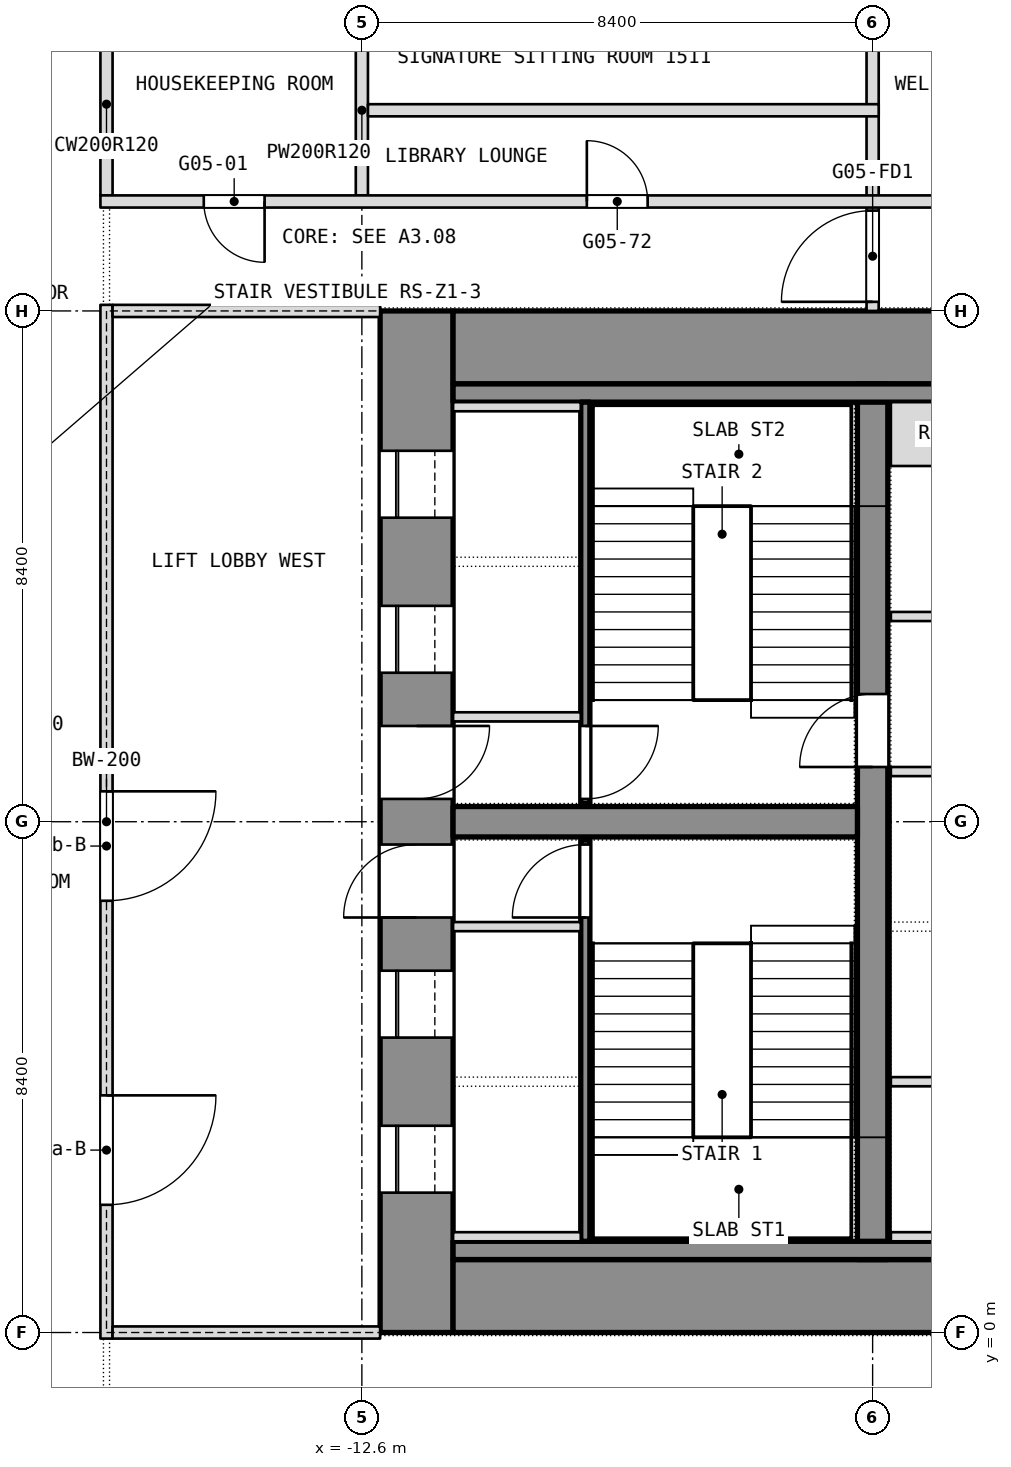
"""IFC4 building model, lengths in metres.
Left out: names, types, materials, properties, quantities, classifications, styles, units other than length and angle.
Written with IfcOpenShell. Run it as: python <this file> out.ifc"""

import sys

from ifc_helpers import new_model, si_unit, direction, frame, frame_2d, origin, place, context, subcontext, project, spatial, rectangle, extrude, element, fill, save


model = new_model("IFC4")
c1 = context("Model", 3, precision=1e-05, world=origin(), true_north=direction((0.0, 1.0)))
c2 = subcontext(c1, "Body", "Model", "MODEL_VIEW")
j1 = project(units=[si_unit("LENGTHUNIT", "METRE"), si_unit("PLANEANGLEUNIT", "RADIAN")], contexts=[c1])
p1 = place(None, origin())
s1 = spatial("IfcSite", under=j1, at=p1, CompositionType="ELEMENT")
p2 = place(p1, origin())
s2 = spatial("IfcBuilding", under=s1, at=p2, CompositionType="ELEMENT")
p3 = place(p2, frame((0.0, 0.0, 68.9)))
s3 = spatial("IfcBuildingStorey", under=s2, at=p3, CompositionType="ELEMENT", Elevation=68.9)
p4 = place(p3, frame((-11.7, 0.0, 0.0), z_axis=(0.0, 0.0, 1.0), x_axis=(0.0, 1.0, 0.0)))
e1 = element("IfcWall", 1, at=p4, inside=s3, PredefinedType="SHEAR", context=c2, shape_type="SweptSolid", body=[
    extrude(rectangle(XDim=16.8, YDim=1.2, at=frame_2d((8.4, 0.0))), origin(), (0.0, 0.0, 1.0), 3.6),
])
p5 = place(p4, frame((2.3, 0.0, 0.0)))
e2 = element("IfcOpeningElement", 2, at=p5, cuts=e1, PredefinedType="OPENING", context=c2, shape_type="SweptSolid", body=[
    extrude(rectangle(XDim=1.1, YDim=2.1, at=frame_2d((0.55, 1.05))), frame((0.0, 0.6, 0.0), z_axis=(0.0, -1.0, 0.0), x_axis=(1.0, 0.0, 0.0)), (0.0, 0.0, 1.0), 1.2),
])
p6 = place(p4, frame((4.85, 0.0, 0.0)))
e3 = element("IfcOpeningElement", 3, at=p6, cuts=e1, PredefinedType="OPENING", context=c2, shape_type="SweptSolid", body=[
    extrude(rectangle(XDim=1.1, YDim=2.1, at=frame_2d((0.55, 1.05))), frame((0.0, 0.6, 0.0), z_axis=(0.0, -1.0, 0.0), x_axis=(1.0, 0.0, 0.0)), (0.0, 0.0, 1.0), 1.2),
])
p7 = place(p4, frame((6.825, 0.0, 0.0)))
e4 = element("IfcOpeningElement", 4, at=p7, cuts=e1, PredefinedType="OPENING", context=c2, shape_type="SweptSolid", body=[
    extrude(rectangle(XDim=1.2, YDim=2.1, at=frame_2d((0.6, 1.05))), frame((0.0, 0.6, 0.0), z_axis=(0.0, -1.0, 0.0), x_axis=(1.0, 0.0, 0.0)), (0.0, 0.0, 1.0), 1.2),
])
p8 = place(p4, frame((13.4, 0.0, 0.0)))
e5 = element("IfcOpeningElement", 5, at=p8, cuts=e1, PredefinedType="OPENING", context=c2, shape_type="SweptSolid", body=[
    extrude(rectangle(XDim=1.1, YDim=2.1, at=frame_2d((0.55, 1.05))), frame((0.0, 0.6, 0.0), z_axis=(0.0, -1.0, 0.0), x_axis=(1.0, 0.0, 0.0)), (0.0, 0.0, 1.0), 1.2),
])
p9 = place(p4, frame((10.85, 0.0, 0.0)))
e6 = element("IfcOpeningElement", 6, at=p9, cuts=e1, PredefinedType="OPENING", context=c2, shape_type="SweptSolid", body=[
    extrude(rectangle(XDim=1.1, YDim=2.1, at=frame_2d((0.55, 1.05))), frame((0.0, 0.6, 0.0), z_axis=(0.0, -1.0, 0.0), x_axis=(1.0, 0.0, 0.0)), (0.0, 0.0, 1.0), 1.2),
])
p10 = place(p4, frame((8.775, 0.0, 0.0)))
e7 = element("IfcOpeningElement", 7, at=p10, cuts=e1, PredefinedType="OPENING", context=c2, shape_type="SweptSolid", body=[
    extrude(rectangle(XDim=1.2, YDim=2.1, at=frame_2d((0.6, 1.05))), frame((0.0, 0.6, 0.0), z_axis=(0.0, -1.0, 0.0), x_axis=(1.0, 0.0, 0.0)), (0.0, 0.0, 1.0), 1.2),
])
for number, where, z_axis, x_axis in (
    (8, (-11.1, 0.6, 0.0), (0.0, 0.0, 1.0), (1.0, 0.0, 0.0)),
    (9, (-11.1, 16.2, 0.0), (0.0, 0.0, 1.0), (1.0, 0.0, 0.0)),
):
    element("IfcWall", number, at=place(p3, frame(where, z_axis=z_axis, x_axis=x_axis)), inside=s3, PredefinedType="SHEAR", context=c2, shape_type="SweptSolid", body=[
        extrude(rectangle(XDim=22.2, YDim=1.2, at=frame_2d((11.1, 0.0))), origin(), (0.0, 0.0, 1.0), 3.6),
    ])
p11 = place(p3, frame((-4.2, 1.2, 0.0), z_axis=(0.0, 0.0, 1.0), x_axis=(0.0, 1.0, 0.0)))
e10 = element("IfcWall", 10, at=p11, inside=s3, PredefinedType="SHEAR", context=c2, shape_type="SweptSolid", body=[
    extrude(rectangle(XDim=14.4, YDim=0.5, at=frame_2d((7.2, 0.0))), origin(), (0.0, 0.0, 1.0), 3.6),
])
p12 = place(p11, frame((8.1, 0.0, 0.0)))
e11 = element("IfcOpeningElement", 11, at=p12, cuts=e10, PredefinedType="OPENING", context=c2, shape_type="SweptSolid", body=[
    extrude(rectangle(XDim=1.2, YDim=2.1, at=frame_2d((0.6, 1.05))), frame((0.0, 0.25, 0.0), z_axis=(0.0, -1.0, 0.0), x_axis=(1.0, 0.0, 0.0)), (0.0, 0.0, 1.0), 0.5),
])
p13 = place(p3, frame((-11.1, 8.4, 0.0), z_axis=(0.0, 0.0, 1.0), x_axis=(1.0, 0.0, 0.0)))
e12 = element("IfcWall", 12, at=p13, inside=s3, PredefinedType="SHEAR", context=c2, shape_type="SweptSolid", body=[
    extrude(rectangle(XDim=6.65, YDim=0.5, at=frame_2d((3.325, 0.0))), origin(), (0.0, 0.0, 1.0), 3.6),
])
p14 = place(p3, frame((-4.2, 16.8, 0.0), z_axis=(0.0, 0.0, 1.0), x_axis=(0.0, 1.0, 0.0)))
e13 = element("IfcWall", 13, at=p14, inside=s3, PredefinedType="PARTITIONING", context=c2, shape_type="SweptSolid", body=[
    extrude(rectangle(XDim=6.7, YDim=0.2, at=frame_2d((3.35, 0.0))), origin(), (0.0, 0.0, 1.0), 3.34),
])
p15 = place(p14, frame((0.15, 0.0, 0.0)))
e14 = element("IfcOpeningElement", 14, at=p15, cuts=e13, PredefinedType="OPENING", context=c2, shape_type="SweptSolid", body=[
    extrude(rectangle(XDim=1.5, YDim=2.1, at=frame_2d((0.75, 1.05))), frame((0.0, 0.1, 0.0), z_axis=(0.0, -1.0, 0.0), x_axis=(1.0, 0.0, 0.0)), (0.0, 0.0, 1.0), 0.2),
])
p16 = place(p14, frame((4.95, 0.0, 0.0)))
e15 = element("IfcOpeningElement", 15, at=p16, cuts=e13, PredefinedType="OPENING", context=c2, shape_type="SweptSolid", body=[
    extrude(rectangle(XDim=1.5, YDim=2.1, at=frame_2d((0.75, 1.05))), frame((0.0, 0.1, 0.0), z_axis=(0.0, -1.0, 0.0), x_axis=(1.0, 0.0, 0.0)), (0.0, 0.0, 1.0), 0.2),
])
p17 = place(p3, frame((-12.6, 18.7, 0.0), z_axis=(0.0, 0.0, 1.0), x_axis=(0.0, 1.0, 0.0)))
e16 = element("IfcWall", 16, at=p17, inside=s3, PredefinedType="PARTITIONING", context=c2, shape_type="SweptSolid", body=[
    extrude(rectangle(XDim=2.8, YDim=0.2, at=frame_2d((1.4, 0.0))), origin(), (0.0, 0.0, 1.0), 3.34),
])
p18 = place(p3, frame((-16.8, 18.7, 0.0), z_axis=(0.0, 0.0, 1.0), x_axis=(0.0, 1.0, 0.0)))
e17 = element("IfcWall", 17, at=p18, inside=s3, PredefinedType="PARTITIONING", context=c2, shape_type="SweptSolid", body=[
    extrude(rectangle(XDim=3.0, YDim=0.2, at=frame_2d((1.5, 0.0))), origin(), (0.0, 0.0, 1.0), 3.34),
])
p19 = place(p3, frame((-16.9, 18.6, 0.0), z_axis=(0.0, 0.0, 1.0), x_axis=(1.0, 0.0, 0.0)))
e18 = element("IfcWall", 18, at=p19, inside=s3, PredefinedType="PARTITIONING", context=c2, shape_type="SweptSolid", body=[
    extrude(rectangle(XDim=25.1, YDim=0.2, at=frame_2d((12.55, 0.0))), origin(), (0.0, 0.0, 1.0), 3.34),
])
p20 = place(p19, frame((1.7, 0.0, 0.0)))
e19 = element("IfcOpeningElement", 19, at=p20, cuts=e18, PredefinedType="OPENING", context=c2, shape_type="SweptSolid", body=[
    extrude(rectangle(XDim=1.0, YDim=2.1, at=frame_2d((0.5, 1.05))), frame((0.0, 0.1, 0.0), z_axis=(0.0, -1.0, 0.0), x_axis=(1.0, 0.0, 0.0)), (0.0, 0.0, 1.0), 0.2),
])
p21 = place(p19, frame((8.0, 0.0, 0.0)))
e20 = element("IfcOpeningElement", 20, at=p21, cuts=e18, PredefinedType="OPENING", context=c2, shape_type="SweptSolid", body=[
    extrude(rectangle(XDim=1.0, YDim=2.1, at=frame_2d((0.5, 1.05))), frame((0.0, 0.1, 0.0), z_axis=(0.0, -1.0, 0.0), x_axis=(1.0, 0.0, 0.0)), (0.0, 0.0, 1.0), 0.2),
])
p22 = place(p19, frame((22.55, 0.0, 0.0)))
e21 = element("IfcOpeningElement", 21, at=p22, cuts=e18, PredefinedType="OPENING", context=c2, shape_type="SweptSolid", body=[
    extrude(rectangle(XDim=1.0, YDim=2.1, at=frame_2d((0.5, 1.05))), frame((0.0, 0.1, 0.0), z_axis=(0.0, -1.0, 0.0), x_axis=(1.0, 0.0, 0.0)), (0.0, 0.0, 1.0), 0.2),
])
p23 = place(p19, frame((14.3, 0.0, 0.0)))
e22 = element("IfcOpeningElement", 22, at=p23, cuts=e18, PredefinedType="OPENING", context=c2, shape_type="SweptSolid", body=[
    extrude(rectangle(XDim=1.0, YDim=2.1, at=frame_2d((0.5, 1.05))), frame((0.0, 0.1, 0.0), z_axis=(0.0, -1.0, 0.0), x_axis=(1.0, 0.0, 0.0)), (0.0, 0.0, 1.0), 0.2),
])
p24 = place(p19, frame((18.5, 0.0, 0.0)))
e23 = element("IfcOpeningElement", 23, at=p24, cuts=e18, PredefinedType="OPENING", context=c2, shape_type="SweptSolid", body=[
    extrude(rectangle(XDim=1.0, YDim=2.1, at=frame_2d((0.5, 1.05))), frame((0.0, 0.1, 0.0), z_axis=(0.0, -1.0, 0.0), x_axis=(1.0, 0.0, 0.0)), (0.0, 0.0, 1.0), 0.2),
])
p25 = place(p3, frame((-12.5, 20.1, 0.0), z_axis=(0.0, 0.0, 1.0), x_axis=(1.0, 0.0, 0.0)))
e24 = element("IfcWall", 24, at=p25, inside=s3, PredefinedType="PARTITIONING", context=c2, shape_type="SweptSolid", body=[
    extrude(rectangle(XDim=8.4, YDim=0.2, at=frame_2d((4.2, 0.0))), origin(), (0.0, 0.0, 1.0), 3.34),
])
for number, where, z_axis, x_axis in (
    (25, (-11.1, 1.35, 0.0), (0.0, 0.0, 1.0), (1.0, 0.0, 0.0)),
    (26, (-11.1, 15.45, 0.0), (0.0, 0.0, 1.0), (1.0, 0.0, 0.0)),
):
    element("IfcWall", number, at=place(p3, frame(where, z_axis=z_axis, x_axis=x_axis)), inside=s3, PredefinedType="PARTITIONING", context=c2, shape_type="SweptSolid", body=[
        extrude(rectangle(XDim=22.2, YDim=0.3, at=frame_2d((11.1, 0.0))), origin(), (0.0, 0.0, 1.0), 3.34),
    ])
p26 = place(p3, frame((-8.925, 1.5, 0.0), z_axis=(0.0, 0.0, 1.0), x_axis=(0.0, 1.0, 0.0)))
e27 = element("IfcWall", 27, at=p26, inside=s3, PredefinedType="SHEAR", context=c2, shape_type="SweptSolid", body=[
    extrude(rectangle(XDim=6.6, YDim=0.15, at=frame_2d((3.3, 0.0))), origin(), (0.0, 0.0, 1.0), 3.34),
])
p27 = place(p26, frame((5.325, 0.0, 0.0)))
e28 = element("IfcOpeningElement", 28, at=p27, cuts=e27, PredefinedType="OPENING", context=c2, shape_type="SweptSolid", body=[
    extrude(rectangle(XDim=1.2, YDim=2.1, at=frame_2d((0.6, 1.05))), frame((0.0, 0.075, 0.0), z_axis=(0.0, -1.0, 0.0), x_axis=(1.0, 0.0, 0.0)), (0.0, 0.0, 1.0), 0.15),
])
for number, where, z_axis, x_axis in (
    (29, (-11.1, 6.675, 0.0), (0.0, 0.0, 1.0), (1.0, 0.0, 0.0)),
    (30, (-11.1, 1.575, 0.0), (0.0, 0.0, 1.0), (1.0, 0.0, 0.0)),
):
    element("IfcWall", number, at=place(p3, frame(where, z_axis=z_axis, x_axis=x_axis)), inside=s3, PredefinedType="SHEAR", context=c2, shape_type="SweptSolid", body=[
        extrude(rectangle(XDim=2.1, YDim=0.15, at=frame_2d((1.05, 0.0))), origin(), (0.0, 0.0, 1.0), 3.6),
    ])
p28 = place(p3, frame((-8.925, 8.7, 0.0), z_axis=(0.0, 0.0, 1.0), x_axis=(0.0, 1.0, 0.0)))
e31 = element("IfcWall", 31, at=p28, inside=s3, PredefinedType="SHEAR", context=c2, shape_type="SweptSolid", body=[
    extrude(rectangle(XDim=6.6, YDim=0.15, at=frame_2d((3.3, 0.0))), origin(), (0.0, 0.0, 1.0), 3.34),
])
p29 = place(p28, frame((0.075, 0.0, 0.0)))
e32 = element("IfcOpeningElement", 32, at=p29, cuts=e31, PredefinedType="OPENING", context=c2, shape_type="SweptSolid", body=[
    extrude(rectangle(XDim=1.2, YDim=2.1, at=frame_2d((0.6, 1.05))), frame((0.0, 0.075, 0.0), z_axis=(0.0, -1.0, 0.0), x_axis=(1.0, 0.0, 0.0)), (0.0, 0.0, 1.0), 0.15),
])
for number, where, z_axis, x_axis in (
    (33, (-11.1, 10.125, 0.0), (0.0, 0.0, 1.0), (1.0, 0.0, 0.0)),
    (34, (-11.1, 15.225, 0.0), (0.0, 0.0, 1.0), (1.0, 0.0, 0.0)),
):
    element("IfcWall", number, at=place(p3, frame(where, z_axis=z_axis, x_axis=x_axis)), inside=s3, PredefinedType="SHEAR", context=c2, shape_type="SweptSolid", body=[
        extrude(rectangle(XDim=2.1, YDim=0.15, at=frame_2d((1.05, 0.0))), origin(), (0.0, 0.0, 1.0), 3.6),
    ])
p30 = place(p3, frame((-3.9, 4.125, 0.0), z_axis=(0.0, 0.0, 1.0), x_axis=(1.0, 0.0, 0.0)))
e35 = element("IfcWall", 35, at=p30, inside=s3, PredefinedType="PARTITIONING", context=c2, shape_type="SweptSolid", body=[
    extrude(rectangle(XDim=7.8, YDim=0.15, at=frame_2d((3.9, 0.0))), origin(), (0.0, 0.0, 1.0), 3.34),
])
p31 = place(p30, frame((3.75, 0.0, 0.0)))
e36 = element("IfcOpeningElement", 36, at=p31, cuts=e35, PredefinedType="OPENING", context=c2, shape_type="SweptSolid", body=[
    extrude(rectangle(XDim=1.2, YDim=2.1, at=frame_2d((0.6, 1.05))), frame((0.0, 0.075, 0.0), z_axis=(0.0, -1.0, 0.0), x_axis=(1.0, 0.0, 0.0)), (0.0, 0.0, 1.0), 0.15),
])
p32 = place(p3, frame((-3.9, 11.775, 0.0), z_axis=(0.0, 0.0, 1.0), x_axis=(1.0, 0.0, 0.0)))
e37 = element("IfcWall", 37, at=p32, inside=s3, PredefinedType="PARTITIONING", context=c2, shape_type="SweptSolid", body=[
    extrude(rectangle(XDim=7.8, YDim=0.15, at=frame_2d((3.9, 0.0))), origin(), (0.0, 0.0, 1.0), 3.34),
])
p33 = place(p32, frame((3.3, 0.0, 0.0)))
e38 = element("IfcOpeningElement", 38, at=p33, cuts=e37, PredefinedType="OPENING", context=c2, shape_type="SweptSolid", body=[
    extrude(rectangle(XDim=1.2, YDim=2.1, at=frame_2d((0.6, 1.05))), frame((0.0, 0.075, 0.0), z_axis=(0.0, -1.0, 0.0), x_axis=(1.0, 0.0, 0.0)), (0.0, 0.0, 1.0), 0.15),
])
p34 = place(p3, frame((-3.9, 1.575, 0.0), z_axis=(0.0, 0.0, 1.0), x_axis=(1.0, 0.0, 0.0)))
e39 = element("IfcWall", 39, at=p34, inside=s3, PredefinedType="SHEAR", context=c2, shape_type="SweptSolid", body=[
    extrude(rectangle(XDim=3.0, YDim=0.15, at=frame_2d((1.5, 0.0))), origin(), (0.0, 0.0, 1.0), 3.6),
])
p35 = place(p3, frame((-3.9, 9.225, 0.0), z_axis=(0.0, 0.0, 1.0), x_axis=(1.0, 0.0, 0.0)))
e40 = element("IfcWall", 40, at=p35, inside=s3, PredefinedType="SHEAR", context=c2, shape_type="SweptSolid", body=[
    extrude(rectangle(XDim=2.25, YDim=0.15, at=frame_2d((1.125, 0.0))), origin(), (0.0, 0.0, 1.0), 3.6),
])
p36 = place(p3, frame((-3.9, 14.775, 0.0), z_axis=(0.0, 0.0, 1.0), x_axis=(1.0, 0.0, 0.0)))
e41 = element("IfcWall", 41, at=p36, inside=s3, PredefinedType="PARTITIONING", context=c2, shape_type="SweptSolid", body=[
    extrude(rectangle(XDim=2.25, YDim=1.05, at=frame_2d((1.125, 0.0))), origin(), (0.0, 0.0, 1.0), 3.34),
])
p37 = place(p3, frame((-16.8, -0.1, 0.0), z_axis=(0.0, 0.0, 1.0), x_axis=(0.0, 1.0, 0.0)))
e42 = element("IfcWall", 42, at=p37, inside=s3, PredefinedType="PARTITIONING", context=c2, shape_type="SweptSolid", body=[
    extrude(rectangle(XDim=17.0, YDim=0.2, at=frame_2d((8.5, 0.0))), origin(), (0.0, 0.0, 1.0), 3.34),
])
p38 = place(p37, frame((2.2, 0.0, 0.0)))
e43 = element("IfcOpeningElement", 43, at=p38, cuts=e42, PredefinedType="OPENING", context=c2, shape_type="SweptSolid", body=[
    extrude(rectangle(XDim=1.8, YDim=2.1, at=frame_2d((0.9, 1.05))), frame((0.0, 0.1, 0.0), z_axis=(0.0, -1.0, 0.0), x_axis=(1.0, 0.0, 0.0)), (0.0, 0.0, 1.0), 0.2),
])
p39 = place(p37, frame((7.2, 0.0, 0.0)))
e44 = element("IfcOpeningElement", 44, at=p39, cuts=e42, PredefinedType="OPENING", context=c2, shape_type="SweptSolid", body=[
    extrude(rectangle(XDim=1.8, YDim=2.1, at=frame_2d((0.9, 1.05))), frame((0.0, 0.1, 0.0), z_axis=(0.0, -1.0, 0.0), x_axis=(1.0, 0.0, 0.0)), (0.0, 0.0, 1.0), 0.2),
])
for number, where, z_axis, x_axis in (
    (45, (-16.7, 0.0, 0.0), (0.0, 0.0, 1.0), (1.0, 0.0, 0.0)),
    (46, (-16.7, 16.8, 0.0), (0.0, 0.0, 1.0), (1.0, 0.0, 0.0)),
):
    element("IfcWall", number, at=place(p3, frame(where, z_axis=z_axis, x_axis=x_axis)), inside=s3, PredefinedType="PARTITIONING", context=c2, shape_type="SweptSolid", body=[
        extrude(rectangle(XDim=4.4, YDim=0.2, at=frame_2d((2.2, 0.0))), origin(), (0.0, 0.0, 1.0), 2.84),
    ])
p40 = place(p20, origin())
e47 = element("IfcDoor", 47, at=p40, inside=s3, OperationType="SINGLE_SWING_RIGHT", PredefinedType="DOOR", context=c2, shape_type="SweptSolid", body=[
    extrude(rectangle(XDim=1.0, YDim=2.1, at=frame_2d((0.5, 1.05))), frame((0.0, 0.025, 0.0), z_axis=(0.0, -1.0, 0.0), x_axis=(1.0, 0.0, 0.0)), (0.0, 0.0, 1.0), 0.05),
])
fill(e19, e47)
p41 = place(p21, origin())
e48 = element("IfcDoor", 48, at=p41, inside=s3, OperationType="SINGLE_SWING_RIGHT", PredefinedType="DOOR", context=c2, shape_type="SweptSolid", body=[
    extrude(rectangle(XDim=1.0, YDim=2.1, at=frame_2d((0.5, 1.05))), frame((0.0, 0.025, 0.0), z_axis=(0.0, -1.0, 0.0), x_axis=(1.0, 0.0, 0.0)), (0.0, 0.0, 1.0), 0.05),
])
fill(e20, e48)
p42 = place(p5, origin())
e49 = element("IfcDoor", 49, at=p42, inside=s3, OperationType="SLIDING_TO_LEFT", PredefinedType="DOOR", context=c2, shape_type="SweptSolid", body=[
    extrude(rectangle(XDim=1.1, YDim=2.1, at=frame_2d((0.55, 1.05))), frame((0.0, 0.025, 0.0), z_axis=(0.0, -1.0, 0.0), x_axis=(1.0, 0.0, 0.0)), (0.0, 0.0, 1.0), 0.05),
])
fill(e2, e49)
p43 = place(p6, origin())
e50 = element("IfcDoor", 50, at=p43, inside=s3, OperationType="SLIDING_TO_LEFT", PredefinedType="DOOR", context=c2, shape_type="SweptSolid", body=[
    extrude(rectangle(XDim=1.1, YDim=2.1, at=frame_2d((0.55, 1.05))), frame((0.0, 0.025, 0.0), z_axis=(0.0, -1.0, 0.0), x_axis=(1.0, 0.0, 0.0)), (0.0, 0.0, 1.0), 0.05),
])
fill(e3, e50)
p44 = place(p7, origin())
e51 = element("IfcDoor", 51, at=p44, inside=s3, OperationType="SINGLE_SWING_LEFT", PredefinedType="DOOR", context=c2, shape_type="SweptSolid", body=[
    extrude(rectangle(XDim=1.2, YDim=2.1, at=frame_2d((0.6, 1.05))), frame((0.0, 0.025, 0.0), z_axis=(0.0, -1.0, 0.0), x_axis=(1.0, 0.0, 0.0)), (0.0, 0.0, 1.0), 0.05),
])
fill(e4, e51)
p45 = place(p27, origin())
e52 = element("IfcDoor", 52, at=p45, inside=s3, OperationType="SINGLE_SWING_LEFT", PredefinedType="DOOR", context=c2, shape_type="SweptSolid", body=[
    extrude(rectangle(XDim=1.2, YDim=2.1, at=frame_2d((0.6, 1.05))), frame((0.0, 0.025, 0.0), z_axis=(0.0, -1.0, 0.0), x_axis=(1.0, 0.0, 0.0)), (0.0, 0.0, 1.0), 0.05),
])
fill(e28, e52)
p46 = place(p8, origin())
e53 = element("IfcDoor", 53, at=p46, inside=s3, OperationType="SLIDING_TO_LEFT", PredefinedType="DOOR", context=c2, shape_type="SweptSolid", body=[
    extrude(rectangle(XDim=1.1, YDim=2.1, at=frame_2d((0.55, 1.05))), frame((0.0, 0.025, 0.0), z_axis=(0.0, -1.0, 0.0), x_axis=(1.0, 0.0, 0.0)), (0.0, 0.0, 1.0), 0.05),
])
fill(e5, e53)
p47 = place(p9, origin())
e54 = element("IfcDoor", 54, at=p47, inside=s3, OperationType="SLIDING_TO_LEFT", PredefinedType="DOOR", context=c2, shape_type="SweptSolid", body=[
    extrude(rectangle(XDim=1.1, YDim=2.1, at=frame_2d((0.55, 1.05))), frame((0.0, 0.025, 0.0), z_axis=(0.0, -1.0, 0.0), x_axis=(1.0, 0.0, 0.0)), (0.0, 0.0, 1.0), 0.05),
])
fill(e6, e54)
p48 = place(p10, origin())
e55 = element("IfcDoor", 55, at=p48, inside=s3, OperationType="SINGLE_SWING_LEFT", PredefinedType="DOOR", context=c2, shape_type="SweptSolid", body=[
    extrude(rectangle(XDim=1.2, YDim=2.1, at=frame_2d((0.6, 1.05))), frame((0.0, 0.025, 0.0), z_axis=(0.0, -1.0, 0.0), x_axis=(1.0, 0.0, 0.0)), (0.0, 0.0, 1.0), 0.05),
])
fill(e7, e55)
p49 = place(p29, origin())
e56 = element("IfcDoor", 56, at=p49, inside=s3, OperationType="SINGLE_SWING_LEFT", PredefinedType="DOOR", context=c2, shape_type="SweptSolid", body=[
    extrude(rectangle(XDim=1.2, YDim=2.1, at=frame_2d((0.6, 1.05))), frame((0.0, 0.025, 0.0), z_axis=(0.0, -1.0, 0.0), x_axis=(1.0, 0.0, 0.0)), (0.0, 0.0, 1.0), 0.05),
])
fill(e32, e56)
p50 = place(p12, origin())
e57 = element("IfcDoor", 57, at=p50, inside=s3, OperationType="SINGLE_SWING_LEFT", PredefinedType="DOOR", context=c2, shape_type="SweptSolid", body=[
    extrude(rectangle(XDim=1.2, YDim=2.1, at=frame_2d((0.6, 1.05))), frame((0.0, 0.025, 0.0), z_axis=(0.0, -1.0, 0.0), x_axis=(1.0, 0.0, 0.0)), (0.0, 0.0, 1.0), 0.05),
])
fill(e11, e57)
p51 = place(p38, origin())
e58 = element("IfcDoor", 58, at=p51, inside=s3, OperationType="DOUBLE_DOOR_SINGLE_SWING", PredefinedType="DOOR", context=c2, shape_type="SweptSolid", body=[
    extrude(rectangle(XDim=1.8, YDim=2.1, at=frame_2d((0.9, 1.05))), frame((0.0, 0.025, 0.0), z_axis=(0.0, -1.0, 0.0), x_axis=(1.0, 0.0, 0.0)), (0.0, 0.0, 1.0), 0.05),
])
fill(e43, e58)
p52 = place(p39, origin())
e59 = element("IfcDoor", 59, at=p52, inside=s3, OperationType="DOUBLE_DOOR_SINGLE_SWING", PredefinedType="DOOR", context=c2, shape_type="SweptSolid", body=[
    extrude(rectangle(XDim=1.8, YDim=2.1, at=frame_2d((0.9, 1.05))), frame((0.0, 0.025, 0.0), z_axis=(0.0, -1.0, 0.0), x_axis=(1.0, 0.0, 0.0)), (0.0, 0.0, 1.0), 0.05),
])
fill(e44, e59)
p53 = place(p15, origin())
e60 = element("IfcDoor", 60, at=p53, inside=s3, OperationType="DOUBLE_DOOR_DOUBLE_SWING", PredefinedType="DOOR", context=c2, shape_type="SweptSolid", body=[
    extrude(rectangle(XDim=1.5, YDim=2.1, at=frame_2d((0.75, 1.05))), frame((0.0, 0.025, 0.0), z_axis=(0.0, -1.0, 0.0), x_axis=(1.0, 0.0, 0.0)), (0.0, 0.0, 1.0), 0.05),
])
fill(e14, e60)
save(model, sys.argv[1])
